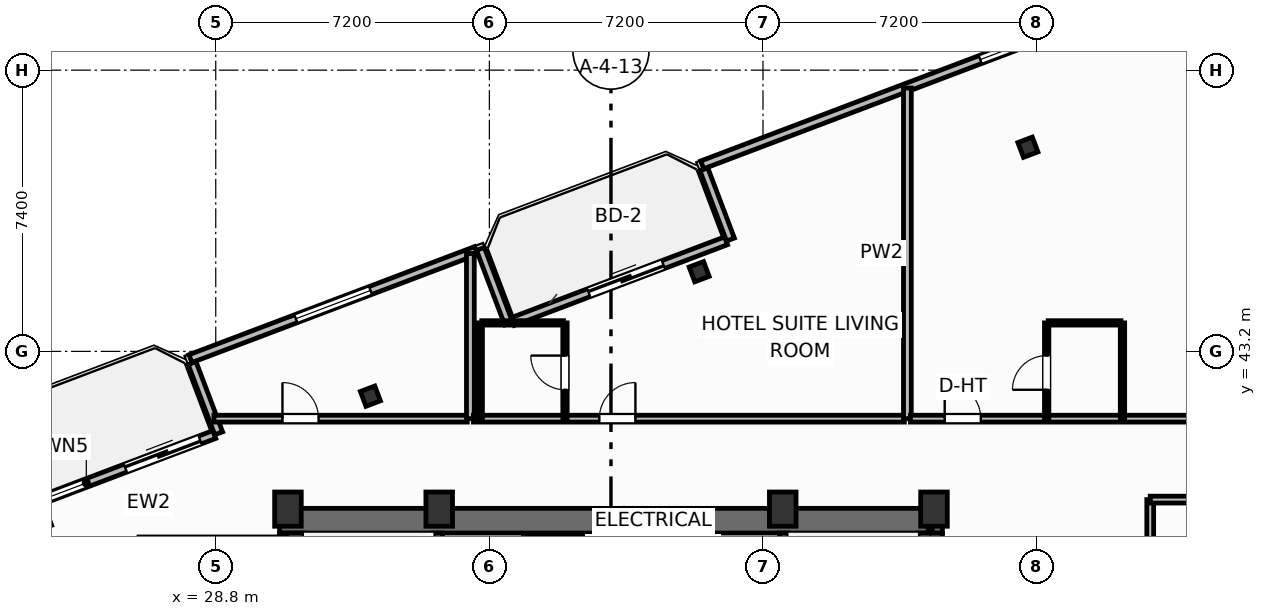
"""IFC4 building model, lengths in metres.
Left out: names, types, materials, properties, quantities, classifications, styles, units other than length and angle.
Written with IfcOpenShell. Run it as: python <this file> out.ifc"""

import sys

from ifc_helpers import new_model, si_unit, direction, frame, frame_2d, origin, origin_2d, place, context, subcontext, project, spatial, rectangle, i_section, extrude, element, fill, save


model = new_model("IFC4")
c1 = context("Model", 3, precision=1e-05, world=origin(), true_north=direction((0.0, 1.0)))
c2 = subcontext(c1, "Body", "Model", "MODEL_VIEW")
j1 = project(units=[si_unit("LENGTHUNIT", "METRE"), si_unit("PLANEANGLEUNIT", "RADIAN")], contexts=[c1])
p1 = place(None, origin())
s1 = spatial("IfcSite", under=j1, at=p1, CompositionType="ELEMENT")
p2 = place(p1, origin())
s2 = spatial("IfcBuilding", under=s1, at=p2, CompositionType="ELEMENT")
p3 = place(p2, frame((0.0, 0.0, 220.1)))
s3 = spatial("IfcBuildingStorey", under=s2, at=p3, CompositionType="ELEMENT", Elevation=220.1)
for number, where, z_axis, x_axis in (
    (1, (30.7, 39.05, 0.0), (0.0, 0.0, 1.0), (1.0, 0.0, 0.0)),
    (2, (34.68, 39.05, 0.0), (0.0, 0.0, 1.0), (1.0, 0.0, 0.0)),
    (3, (43.72, 39.05, 0.0), (0.0, 0.0, 1.0), (1.0, 0.0, 0.0)),
    (4, (47.7, 39.05, 0.0), (0.0, 0.0, 1.0), (1.0, 0.0, 0.0)),
):
    element("IfcColumn", number, at=place(p3, frame(where, z_axis=z_axis, x_axis=x_axis)), inside=s3, PredefinedType="COLUMN", context=c2, shape_type="SweptSolid", body=[
        extrude(rectangle(XDim=0.7, YDim=0.9, at=origin_2d()), origin(), (0.0, 0.0, 1.0), 3.7),
    ])
p4 = place(p3, frame((30.48, 38.745, 0.0), z_axis=(0.0, 0.0, 1.0), x_axis=(1.0, 0.0, 0.0)))
e5 = element("IfcWall", 5, at=p4, inside=s3, PredefinedType="SHEAR", context=c2, shape_type="SweptSolid", body=[
    extrude(rectangle(XDim=17.44, YDim=0.65, at=frame_2d((8.72, 0.0))), origin(), (0.0, 0.0, 1.0), 3.45),
])
for number, where, z_axis, x_axis in (
    (6, (30.805, 29.2, 0.0), (0.0, 0.0, 1.0), (0.0, 1.0, 0.0)),
    (7, (47.595, 29.2, 0.0), (0.0, 0.0, 1.0), (0.0, 1.0, 0.0)),
):
    element("IfcWall", number, at=place(p3, frame(where, z_axis=z_axis, x_axis=x_axis)), inside=s3, PredefinedType="SHEAR", context=c2, shape_type="SweptSolid", body=[
        extrude(rectangle(XDim=9.22, YDim=0.65, at=frame_2d((4.61, 0.0))), origin(), (0.0, 0.0, 1.0), 3.45),
    ])
p5 = place(p3, frame((34.64, 29.2, 0.0), z_axis=(0.0, 0.0, 1.0), x_axis=(0.0, 1.0, 0.0)))
e8 = element("IfcWall", 8, at=p5, inside=s3, PredefinedType="SHEAR", context=c2, shape_type="SweptSolid", body=[
    extrude(rectangle(XDim=9.22, YDim=0.25, at=frame_2d((4.61, 0.0))), origin(), (0.0, 0.0, 1.0), 3.45),
])
p6 = place(p5, frame((0.65, 0.0, 0.0)))
e9 = element("IfcOpeningElement", 9, at=p6, cuts=e8, PredefinedType="OPENING", context=c2, shape_type="SweptSolid", body=[
    extrude(rectangle(XDim=1.05, YDim=2.15, at=frame_2d((0.525, 1.075))), frame((0.0, 0.135, 0.0), z_axis=(0.0, -1.0, 0.0), x_axis=(1.0, 0.0, 0.0)), (0.0, 0.0, 1.0), 0.27),
])
p7 = place(p3, frame((43.76, 29.2, 0.0), z_axis=(0.0, 0.0, 1.0), x_axis=(0.0, 1.0, 0.0)))
e10 = element("IfcWall", 10, at=p7, inside=s3, PredefinedType="SHEAR", context=c2, shape_type="SweptSolid", body=[
    extrude(rectangle(XDim=9.22, YDim=0.25, at=frame_2d((4.61, 0.0))), origin(), (0.0, 0.0, 1.0), 3.45),
])
p8 = place(p7, frame((0.65, 0.0, 0.0)))
e11 = element("IfcOpeningElement", 11, at=p8, cuts=e10, PredefinedType="OPENING", context=c2, shape_type="SweptSolid", body=[
    extrude(rectangle(XDim=1.05, YDim=2.15, at=frame_2d((0.525, 1.075))), frame((0.0, 0.135, 0.0), z_axis=(0.0, -1.0, 0.0), x_axis=(1.0, 0.0, 0.0)), (0.0, 0.0, 1.0), 0.27),
])
for number, where, z_axis, x_axis in (
    (12, (50.171, 48.572, 0.0), (0.0, 0.0, 1.0), (0.935, 0.354, 0.0)),
    (13, (41.52, 45.297, 0.0), (0.0, 0.0, 1.0), (0.935, 0.354, 0.0)),
    (14, (32.869, 42.022, 0.0), (0.0, 0.0, 1.0), (0.935, 0.354, 0.0)),
):
    element("IfcColumn", number, at=place(p3, frame(where, z_axis=z_axis, x_axis=x_axis)), inside=s3, PredefinedType="COLUMN", context=c2, shape_type="SweptSolid", body=[
        extrude(i_section(OverallWidth=0.406, OverallDepth=0.416, WebThickness=0.03, FlangeThickness=0.048, FilletRadius=0.025, at=origin_2d()), origin(), (0.0, 0.0, 1.0), 3.7),
    ])
p9 = place(p3, frame((23.149, 38.887, 0.0), z_axis=(0.0, 0.0, 1.0), x_axis=(0.9352192676, 0.354069091436, 0.0)))
e15 = element("IfcWall", 15, at=p9, inside=s3, PredefinedType="SOLIDWALL", context=c2, shape_type="SweptSolid", body=[
    extrude(rectangle(XDim=6.0, YDim=0.22, at=frame_2d((3.0, 0.0))), origin(), (0.0, 0.0, 1.0), 2.73),
])
p10 = place(p9, frame((3.5, 0.0, 0.0)))
e16 = element("IfcOpeningElement", 16, at=p10, cuts=e15, PredefinedType="OPENING", context=c2, shape_type="SweptSolid", body=[
    extrude(rectangle(XDim=2.1, YDim=2.3, at=frame_2d((1.05, 1.15))), frame((0.0, 0.12, 0.0), z_axis=(0.0, -1.0, 0.0), x_axis=(1.0, 0.0, 0.0)), (0.0, 0.0, 1.0), 0.24),
])
p11 = place(p9, frame((0.55, 0.0, 0.75)))
e17 = element("IfcOpeningElement", 17, at=p11, cuts=e15, PredefinedType="OPENING", context=c2, shape_type="SweptSolid", body=[
    extrude(rectangle(XDim=1.85, YDim=1.75, at=frame_2d((0.925, 0.875))), frame((0.0, 0.12, 0.0), z_axis=(0.0, -1.0, 0.0), x_axis=(1.0, 0.0, 0.0)), (0.0, 0.0, 1.0), 0.24),
])
p12 = place(p3, frame((36.617, 43.986, 0.0), z_axis=(0.0, 0.0, 1.0), x_axis=(0.935227640088, 0.354046976001, 0.0)))
e18 = element("IfcWall", 18, at=p12, inside=s3, PredefinedType="SOLIDWALL", context=c2, shape_type="SweptSolid", body=[
    extrude(rectangle(XDim=6.0, YDim=0.22, at=frame_2d((3.0, 0.0))), origin(), (0.0, 0.0, 1.0), 2.73),
])
p13 = place(p12, frame((2.136, 0.0, 0.0)))
e19 = element("IfcOpeningElement", 19, at=p13, cuts=e18, PredefinedType="OPENING", context=c2, shape_type="SweptSolid", body=[
    extrude(rectangle(XDim=2.1, YDim=2.3, at=frame_2d((1.05, 1.15))), frame((0.0, 0.12, 0.0), z_axis=(0.0, -1.0, 0.0), x_axis=(1.0, 0.0, 0.0)), (0.0, 0.0, 1.0), 0.24),
])
p14 = place(p3, frame((58.198, 54.391, 0.0), z_axis=(0.0, 0.0, 1.0), x_axis=(-0.935223849772, -0.354056988094, 0.0)))
e20 = element("IfcWall", 20, at=p14, inside=s3, PredefinedType="SOLIDWALL", context=c2, shape_type="SweptSolid", body=[
    extrude(rectangle(XDim=17.747, YDim=0.22, at=frame_2d((8.874, 0.0))), origin(), (0.0, 0.0, 1.0), 2.73),
])
p15 = place(p14, frame((7.823, 0.0, 0.8)))
e21 = element("IfcOpeningElement", 21, at=p15, cuts=e20, PredefinedType="OPENING", context=c2, shape_type="SweptSolid", body=[
    extrude(rectangle(XDim=2.1, YDim=1.75, at=frame_2d((1.05, 0.875))), frame((0.0, 0.12, 0.0), z_axis=(0.0, -1.0, 0.0), x_axis=(1.0, 0.0, 0.0)), (0.0, 0.0, 1.0), 0.24),
])
p16 = place(p3, frame((41.645, 47.99, 0.0), z_axis=(0.0, 0.0, 1.0), x_axis=(0.354020680661, -0.935237594232, 0.0)))
e22 = element("IfcWall", 22, at=p16, inside=s3, PredefinedType="SOLIDWALL", context=c2, shape_type="SweptSolid", body=[
    extrude(rectangle(XDim=1.975, YDim=0.22, at=frame_2d((0.988, 0.0))), origin(), (0.0, 0.0, 1.0), 2.73),
])
p17 = place(p3, frame((36.508, 43.934, 0.0), z_axis=(0.0, 0.0, 1.0), x_axis=(-0.354128469405, 0.935196785258, 0.0)))
e23 = element("IfcWall", 23, at=p17, inside=s3, PredefinedType="SOLIDWALL", context=c2, shape_type="SweptSolid", body=[
    extrude(rectangle(XDim=2.1, YDim=0.22, at=frame_2d((1.05, 0.0))), origin(), (0.0, 0.0, 1.0), 2.73),
])
p18 = place(p3, frame((35.648, 45.854, 0.0), z_axis=(0.0, 0.0, 1.0), x_axis=(-0.935230796934, -0.354038636968, 0.0)))
e24 = element("IfcWall", 24, at=p18, inside=s3, PredefinedType="SOLIDWALL", context=c2, shape_type="SweptSolid", body=[
    extrude(rectangle(XDim=8.035, YDim=0.22, at=frame_2d((4.018, 0.0))), origin(), (0.0, 0.0, 1.0), 2.73),
])
p19 = place(p18, frame((2.968, 0.0, 0.8)))
e25 = element("IfcOpeningElement", 25, at=p19, cuts=e24, PredefinedType="OPENING", context=c2, shape_type="SweptSolid", body=[
    extrude(rectangle(XDim=2.1, YDim=1.75, at=frame_2d((1.05, 0.875))), frame((0.0, 0.12, 0.0), z_axis=(0.0, -1.0, 0.0), x_axis=(1.0, 0.0, 0.0)), (0.0, 0.0, 1.0), 0.24),
])
p20 = place(p3, frame((28.177, 42.892, 0.0), z_axis=(0.0, 0.0, 1.0), x_axis=(0.354061611705, -0.935222099352, 0.0)))
e26 = element("IfcWall", 26, at=p20, inside=s3, PredefinedType="SOLIDWALL", context=c2, shape_type="SweptSolid", body=[
    extrude(rectangle(XDim=1.975, YDim=0.22, at=frame_2d((0.987, 0.0))), origin(), (0.0, 0.0, 1.0), 2.73),
])
p21 = place(p3, frame((28.752, 41.43, 0.0), z_axis=(0.0, 0.0, 1.0), x_axis=(1.0, 0.0, 0.0)))
e27 = element("IfcWall", 27, at=p21, inside=s3, PredefinedType="PARTITIONING", context=c2, shape_type="SweptSolid", body=[
    extrude(rectangle(XDim=6.668, YDim=0.18, at=frame_2d((3.334, 0.0))), origin(), (0.0, 0.0, 1.0), 3.45),
])
p22 = place(p21, frame((1.803, 0.0, 0.0)))
e28 = element("IfcOpeningElement", 28, at=p22, cuts=e27, PredefinedType="OPENING", context=c2, shape_type="SweptSolid", body=[
    extrude(rectangle(XDim=0.95, YDim=2.05, at=frame_2d((0.475, 1.025))), frame((0.0, 0.1, 0.0), z_axis=(0.0, -1.0, 0.0), x_axis=(1.0, 0.0, 0.0)), (0.0, 0.0, 1.0), 0.2),
])
p23 = place(p3, frame((35.5, 41.43, 0.0), z_axis=(0.0, 0.0, 1.0), x_axis=(0.0, 1.0, 0.0)))
e29 = element("IfcWall", 29, at=p23, inside=s3, PredefinedType="PARTITIONING", context=c2, shape_type="SweptSolid", body=[
    extrude(rectangle(XDim=4.346, YDim=0.205, at=frame_2d((2.173, 0.0))), origin(), (0.0, 0.0, 1.0), 3.45),
])
p24 = place(p3, frame((35.58, 41.43, 0.0), z_axis=(0.0, 0.0, 1.0), x_axis=(1.0, 0.0, 0.0)))
e30 = element("IfcWall", 30, at=p24, inside=s3, PredefinedType="PARTITIONING", context=c2, shape_type="SweptSolid", body=[
    extrude(rectangle(XDim=11.34, YDim=0.18, at=frame_2d((5.67, 0.0))), origin(), (0.0, 0.0, 1.0), 3.018),
])
p25 = place(p24, frame((3.313, 0.0, 0.0)))
e31 = element("IfcOpeningElement", 31, at=p25, cuts=e30, PredefinedType="OPENING", context=c2, shape_type="SweptSolid", body=[
    extrude(rectangle(XDim=0.95, YDim=2.15, at=frame_2d((0.475, 1.075))), frame((0.0, 0.1, 0.0), z_axis=(0.0, -1.0, 0.0), x_axis=(1.0, 0.0, 0.0)), (0.0, 0.0, 1.0), 0.2),
])
p26 = place(p3, frame((35.8, 43.95, 0.0), z_axis=(0.0, 0.0, 1.0), x_axis=(1.0, 0.0, 0.0)))
e32 = element("IfcWall", 32, at=p26, inside=s3, PredefinedType="PARTITIONING", context=c2, shape_type="SweptSolid", body=[
    extrude(rectangle(XDim=2.15, YDim=0.115, at=frame_2d((1.075, 0.0))), origin(), (0.0, 0.0, 1.0), 3.45),
])
p27 = place(p3, frame((37.99, 41.43, 0.0), z_axis=(0.0, 0.0, 1.0), x_axis=(0.0, 1.0, 0.0)))
e33 = element("IfcWall", 33, at=p27, inside=s3, PredefinedType="PARTITIONING", context=c2, shape_type="SweptSolid", body=[
    extrude(rectangle(XDim=2.52, YDim=0.115, at=frame_2d((1.26, 0.0))), origin(), (0.0, 0.0, 1.0), 3.45),
])
p28 = place(p27, frame((0.76, 0.0, 0.0)))
e34 = element("IfcOpeningElement", 34, at=p28, cuts=e33, PredefinedType="OPENING", context=c2, shape_type="SweptSolid", body=[
    extrude(rectangle(XDim=0.9, YDim=2.05, at=frame_2d((0.45, 1.025))), frame((0.0, 0.067, 0.0), z_axis=(0.0, -1.0, 0.0), x_axis=(1.0, 0.0, 0.0)), (0.0, 0.0, 1.0), 0.135),
])
p29 = place(p3, frame((35.76, 41.43, 0.0), z_axis=(0.0, 0.0, 1.0), x_axis=(0.0, 1.0, 0.0)))
e35 = element("IfcWall", 35, at=p29, inside=s3, PredefinedType="PARTITIONING", context=c2, shape_type="SweptSolid", body=[
    extrude(rectangle(XDim=2.52, YDim=0.115, at=frame_2d((1.26, 0.0))), origin(), (0.0, 0.0, 1.0), 3.45),
])
p30 = place(p3, frame((47.0, 41.43, 0.0), z_axis=(0.0, 0.0, 1.0), x_axis=(0.0, 1.0, 0.0)))
e36 = element("IfcWall", 36, at=p30, inside=s3, PredefinedType="PARTITIONING", context=c2, shape_type="SweptSolid", body=[
    extrude(rectangle(XDim=8.7, YDim=0.205, at=frame_2d((4.35, 0.0))), origin(), (0.0, 0.0, 1.0), 3.45),
])
p31 = place(p3, frame((47.08, 41.43, 0.0), z_axis=(0.0, 0.0, 1.0), x_axis=(1.0, 0.0, 0.0)))
e37 = element("IfcWall", 37, at=p31, inside=s3, PredefinedType="PARTITIONING", context=c2, shape_type="SweptSolid", body=[
    extrude(rectangle(XDim=21.216, YDim=0.18, at=frame_2d((10.608, 0.0))), origin(), (0.0, 0.0, 1.0), 3.45),
])
p32 = place(p31, frame((0.902, 0.0, 0.0)))
e38 = element("IfcOpeningElement", 38, at=p32, cuts=e37, PredefinedType="OPENING", context=c2, shape_type="SweptSolid", body=[
    extrude(rectangle(XDim=0.95, YDim=2.15, at=frame_2d((0.475, 1.075))), frame((0.0, 0.1, 0.0), z_axis=(0.0, -1.0, 0.0), x_axis=(1.0, 0.0, 0.0)), (0.0, 0.0, 1.0), 0.2),
])
p33 = place(p3, frame((50.705, 43.95, 0.0), z_axis=(0.0, 0.0, 1.0), x_axis=(1.0, 0.0, 0.0)))
e39 = element("IfcWall", 39, at=p33, inside=s3, PredefinedType="PARTITIONING", context=c2, shape_type="SweptSolid", body=[
    extrude(rectangle(XDim=1.915, YDim=0.115, at=frame_2d((0.958, 0.0))), origin(), (0.0, 0.0, 1.0), 3.45),
])
p34 = place(p3, frame((50.665, 41.43, 0.0), z_axis=(0.0, 0.0, 1.0), x_axis=(0.0, 1.0, 0.0)))
e40 = element("IfcWall", 40, at=p34, inside=s3, PredefinedType="PARTITIONING", context=c2, shape_type="SweptSolid", body=[
    extrude(rectangle(XDim=2.52, YDim=0.115, at=frame_2d((1.26, 0.0))), origin(), (0.0, 0.0, 1.0), 3.45),
])
p35 = place(p34, frame((0.76, 0.0, 0.0)))
e41 = element("IfcOpeningElement", 41, at=p35, cuts=e40, PredefinedType="OPENING", context=c2, shape_type="SweptSolid", body=[
    extrude(rectangle(XDim=0.9, YDim=2.05, at=frame_2d((0.45, 1.025))), frame((0.0, 0.067, 0.0), z_axis=(0.0, -1.0, 0.0), x_axis=(1.0, 0.0, 0.0)), (0.0, 0.0, 1.0), 0.135),
])
p36 = place(p3, frame((52.66, 41.43, 0.0), z_axis=(0.0, 0.0, 1.0), x_axis=(0.0, 1.0, 0.0)))
e42 = element("IfcWall", 42, at=p36, inside=s3, PredefinedType="PARTITIONING", context=c2, shape_type="SweptSolid", body=[
    extrude(rectangle(XDim=2.52, YDim=0.115, at=frame_2d((1.26, 0.0))), origin(), (0.0, 0.0, 1.0), 3.45),
])
p37 = place(p3, frame((53.39, 19.24, 0.0), z_axis=(0.0, 0.0, 1.0), x_axis=(0.0, 1.0, 0.0)))
e43 = element("IfcWall", 43, at=p37, inside=s3, PredefinedType="PARTITIONING", context=c2, shape_type="SweptSolid", body=[
    extrude(rectangle(XDim=20.06, YDim=0.18, at=frame_2d((10.03, 0.0))), origin(), (0.0, 0.0, 1.0), 3.45),
])
p38 = place(p37, frame((7.7, 0.0, 0.0)))
e44 = element("IfcOpeningElement", 44, at=p38, cuts=e43, PredefinedType="OPENING", context=c2, shape_type="SweptSolid", body=[
    extrude(rectangle(XDim=0.95, YDim=2.05, at=frame_2d((0.475, 1.025))), frame((0.0, 0.1, 0.0), z_axis=(0.0, -1.0, 0.0), x_axis=(1.0, 0.0, 0.0)), (0.0, 0.0, 1.0), 0.2),
])
p39 = place(p3, frame((53.39, 39.3, 0.0), z_axis=(0.0, 0.0, 1.0), x_axis=(1.0, 0.0, 0.0)))
e45 = element("IfcWall", 45, at=p39, inside=s3, PredefinedType="PARTITIONING", context=c2, shape_type="SweptSolid", body=[
    extrude(rectangle(XDim=15.713, YDim=0.18, at=frame_2d((7.856, 0.0))), origin(), (0.0, 0.0, 1.0), 3.45),
])
p40 = place(p10, origin())
e46 = element("IfcDoor", 46, at=p40, inside=s3, OperationType="SLIDING_TO_LEFT", PredefinedType="DOOR", context=c2, shape_type="SweptSolid", body=[
    extrude(rectangle(XDim=2.1, YDim=2.3, at=frame_2d((1.05, 1.15))), frame((0.0, 0.025, 0.0), z_axis=(0.0, -1.0, 0.0), x_axis=(1.0, 0.0, 0.0)), (0.0, 0.0, 1.0), 0.05),
])
fill(e16, e46)
p41 = place(p11, origin())
e47 = element("IfcWindow", 47, at=p41, inside=s3, PartitioningType="SINGLE_PANEL", PredefinedType="WINDOW", context=c2, shape_type="SweptSolid", body=[
    extrude(rectangle(XDim=1.85, YDim=1.75, at=frame_2d((0.925, 0.875))), frame((0.0, 0.03, 0.0), z_axis=(0.0, -1.0, 0.0), x_axis=(1.0, 0.0, 0.0)), (0.0, 0.0, 1.0), 0.06),
])
fill(e17, e47)
p42 = place(p13, origin())
e48 = element("IfcDoor", 48, at=p42, inside=s3, OperationType="SLIDING_TO_LEFT", PredefinedType="DOOR", context=c2, shape_type="SweptSolid", body=[
    extrude(rectangle(XDim=2.1, YDim=2.3, at=frame_2d((1.05, 1.15))), frame((0.0, 0.025, 0.0), z_axis=(0.0, -1.0, 0.0), x_axis=(1.0, 0.0, 0.0)), (0.0, 0.0, 1.0), 0.05),
])
fill(e19, e48)
p43 = place(p15, origin())
e49 = element("IfcWindow", 49, at=p43, inside=s3, PartitioningType="SINGLE_PANEL", PredefinedType="WINDOW", context=c2, shape_type="SweptSolid", body=[
    extrude(rectangle(XDim=2.1, YDim=1.75, at=frame_2d((1.05, 0.875))), frame((0.0, 0.03, 0.0), z_axis=(0.0, -1.0, 0.0), x_axis=(1.0, 0.0, 0.0)), (0.0, 0.0, 1.0), 0.06),
])
fill(e21, e49)
p44 = place(p19, origin())
e50 = element("IfcWindow", 50, at=p44, inside=s3, PartitioningType="SINGLE_PANEL", PredefinedType="WINDOW", context=c2, shape_type="SweptSolid", body=[
    extrude(rectangle(XDim=2.1, YDim=1.75, at=frame_2d((1.05, 0.875))), frame((0.0, 0.03, 0.0), z_axis=(0.0, -1.0, 0.0), x_axis=(1.0, 0.0, 0.0)), (0.0, 0.0, 1.0), 0.06),
])
fill(e25, e50)
p45 = place(p22, origin())
e51 = element("IfcDoor", 51, at=p45, inside=s3, OperationType="SINGLE_SWING_LEFT", PredefinedType="DOOR", context=c2, shape_type="SweptSolid", body=[
    extrude(rectangle(XDim=0.95, YDim=2.05, at=frame_2d((0.475, 1.025))), frame((0.0, 0.025, 0.0), z_axis=(0.0, -1.0, 0.0), x_axis=(1.0, 0.0, 0.0)), (0.0, 0.0, 1.0), 0.05),
])
fill(e28, e51)
p46 = place(p25, origin())
e52 = element("IfcDoor", 52, at=p46, inside=s3, OperationType="SINGLE_SWING_RIGHT", PredefinedType="DOOR", context=c2, shape_type="SweptSolid", body=[
    extrude(rectangle(XDim=0.95, YDim=2.15, at=frame_2d((0.475, 1.075))), frame((0.0, 0.025, 0.0), z_axis=(0.0, -1.0, 0.0), x_axis=(1.0, 0.0, 0.0)), (0.0, 0.0, 1.0), 0.05),
])
fill(e31, e52)
p47 = place(p28, origin())
e53 = element("IfcDoor", 53, at=p47, inside=s3, OperationType="SINGLE_SWING_RIGHT", PredefinedType="DOOR", context=c2, shape_type="SweptSolid", body=[
    extrude(rectangle(XDim=0.9, YDim=2.05, at=frame_2d((0.45, 1.025))), frame((0.0, 0.025, 0.0), z_axis=(0.0, -1.0, 0.0), x_axis=(1.0, 0.0, 0.0)), (0.0, 0.0, 1.0), 0.05),
])
fill(e34, e53)
p48 = place(p32, origin())
e54 = element("IfcDoor", 54, at=p48, inside=s3, OperationType="SINGLE_SWING_LEFT", PredefinedType="DOOR", context=c2, shape_type="SweptSolid", body=[
    extrude(rectangle(XDim=0.95, YDim=2.15, at=frame_2d((0.475, 1.075))), frame((0.0, 0.025, 0.0), z_axis=(0.0, -1.0, 0.0), x_axis=(1.0, 0.0, 0.0)), (0.0, 0.0, 1.0), 0.05),
])
fill(e38, e54)
p49 = place(p35, origin())
e55 = element("IfcDoor", 55, at=p49, inside=s3, OperationType="SINGLE_SWING_LEFT", PredefinedType="DOOR", context=c2, shape_type="SweptSolid", body=[
    extrude(rectangle(XDim=0.9, YDim=2.05, at=frame_2d((0.45, 1.025))), frame((0.0, 0.025, 0.0), z_axis=(0.0, -1.0, 0.0), x_axis=(1.0, 0.0, 0.0)), (0.0, 0.0, 1.0), 0.05),
])
fill(e41, e55)
save(model, sys.argv[1])
